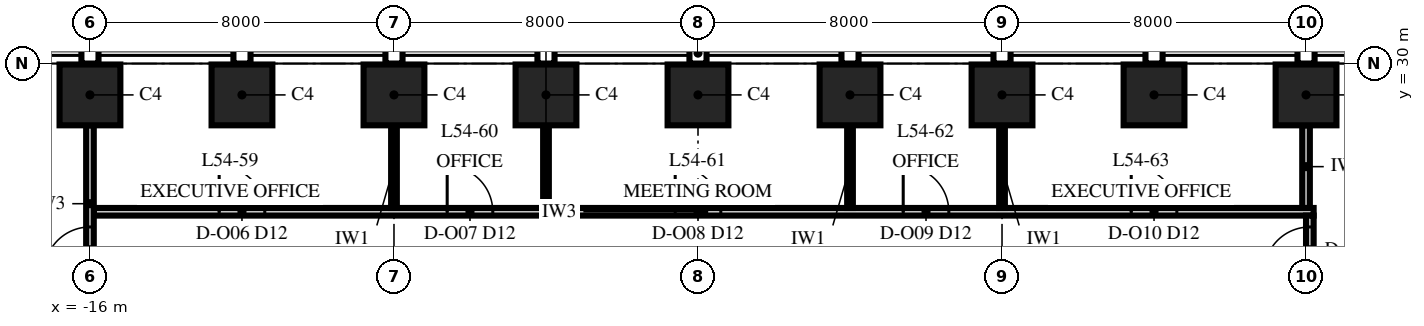
"""IFC4 building model, lengths in metres.
Left out: names, types, materials, properties, quantities, classifications, styles, units other than length and angle.
Written with IfcOpenShell. Run it as: python <this file> out.ifc"""

import sys

from ifc_helpers import new_model, si_unit, direction, frame, frame_2d, origin, origin_2d, place, context, subcontext, project, spatial, rectangle, extrude, element, fill, save


model = new_model("IFC4")
c1 = context("Model", 3, precision=1e-05, world=origin(), true_north=direction((0.0, 1.0)))
c2 = subcontext(c1, "Body", "Model", "MODEL_VIEW")
j1 = project(units=[si_unit("LENGTHUNIT", "METRE"), si_unit("PLANEANGLEUNIT", "RADIAN")], contexts=[c1])
p1 = place(None, origin())
s1 = spatial("IfcSite", under=j1, at=p1, CompositionType="ELEMENT")
p2 = place(p1, origin())
s2 = spatial("IfcBuilding", under=s1, at=p2, CompositionType="ELEMENT")
p3 = place(p2, frame((0.0, 0.0, 234.0)))
s3 = spatial("IfcBuildingStorey", under=s2, at=p3, CompositionType="ELEMENT", Elevation=234.0)
for number, where, z_axis, x_axis in (
    (1, (16.0, 29.175, 0.0), (0.0, 0.0, 1.0), (-1.0, 0.0, 0.0)),
    (2, (12.0, 29.175, 0.0), (0.0, 0.0, 1.0), (-1.0, 0.0, 0.0)),
    (3, (8.0, 29.175, 0.0), (0.0, 0.0, 1.0), (-1.0, 0.0, 0.0)),
    (4, (4.0, 29.175, 0.0), (0.0, 0.0, 1.0), (-1.0, 0.0, 0.0)),
    (5, (0.0, 29.175, 0.0), (0.0, 0.0, 1.0), (-1.0, 0.0, 0.0)),
    (6, (-4.0, 29.175, 0.0), (0.0, 0.0, 1.0), (-1.0, 0.0, 0.0)),
    (7, (-8.0, 29.175, 0.0), (0.0, 0.0, 1.0), (-1.0, 0.0, 0.0)),
    (8, (-12.0, 29.175, 0.0), (0.0, 0.0, 1.0), (-1.0, 0.0, 0.0)),
    (9, (-16.0, 29.175, 0.0), (0.0, 0.0, 1.0), (-1.0, 0.0, 0.0)),
):
    element("IfcColumn", number, at=place(p3, frame(where, z_axis=z_axis, x_axis=x_axis)), inside=s3, PredefinedType="COLUMN", context=c2, shape_type="SweptSolid", body=[
        extrude(rectangle(XDim=1.6, YDim=1.6, at=origin_2d()), origin(), (0.0, 0.0, 1.0), 4.0),
    ])
p4 = place(p3, frame((-15.9, 26.1, 0.0), z_axis=(0.0, 0.0, 1.0), x_axis=(1.0, 0.0, 0.0)))
e10 = element("IfcWall", 10, at=p4, inside=s3, PredefinedType="PARTITIONING", context=c2, shape_type="SweptSolid", body=[
    extrude(rectangle(XDim=32.1, YDim=0.2, at=frame_2d((16.05, 0.0))), origin(), (0.0, 0.0, 1.0), 3.4),
])
p5 = place(p4, frame((3.3, 0.0, 0.0)))
e11 = element("IfcOpeningElement", 11, at=p5, cuts=e10, PredefinedType="OPENING", context=c2, shape_type="SweptSolid", body=[
    extrude(rectangle(XDim=1.2, YDim=2.4, at=frame_2d((0.6, 1.2))), frame((0.0, 0.115, 0.0), z_axis=(0.0, -1.0, 0.0), x_axis=(1.0, 0.0, 0.0)), (0.0, 0.0, 1.0), 0.23),
])
p6 = place(p4, frame((9.3, 0.0, 0.0)))
e12 = element("IfcOpeningElement", 12, at=p6, cuts=e10, PredefinedType="OPENING", context=c2, shape_type="SweptSolid", body=[
    extrude(rectangle(XDim=1.2, YDim=2.4, at=frame_2d((0.6, 1.2))), frame((0.0, 0.115, 0.0), z_axis=(0.0, -1.0, 0.0), x_axis=(1.0, 0.0, 0.0)), (0.0, 0.0, 1.0), 0.23),
])
p7 = place(p4, frame((15.3, 0.0, 0.0)))
e13 = element("IfcOpeningElement", 13, at=p7, cuts=e10, PredefinedType="OPENING", context=c2, shape_type="SweptSolid", body=[
    extrude(rectangle(XDim=1.2, YDim=2.4, at=frame_2d((0.6, 1.2))), frame((0.0, 0.115, 0.0), z_axis=(0.0, -1.0, 0.0), x_axis=(1.0, 0.0, 0.0)), (0.0, 0.0, 1.0), 0.23),
])
p8 = place(p4, frame((21.3, 0.0, 0.0)))
e14 = element("IfcOpeningElement", 14, at=p8, cuts=e10, PredefinedType="OPENING", context=c2, shape_type="SweptSolid", body=[
    extrude(rectangle(XDim=1.2, YDim=2.4, at=frame_2d((0.6, 1.2))), frame((0.0, 0.115, 0.0), z_axis=(0.0, -1.0, 0.0), x_axis=(1.0, 0.0, 0.0)), (0.0, 0.0, 1.0), 0.23),
])
p9 = place(p4, frame((27.3, 0.0, 0.0)))
e15 = element("IfcOpeningElement", 15, at=p9, cuts=e10, PredefinedType="OPENING", context=c2, shape_type="SweptSolid", body=[
    extrude(rectangle(XDim=1.2, YDim=2.4, at=frame_2d((0.6, 1.2))), frame((0.0, 0.115, 0.0), z_axis=(0.0, -1.0, 0.0), x_axis=(1.0, 0.0, 0.0)), (0.0, 0.0, 1.0), 0.23),
])
p10 = place(p3, frame((-16.0, 24.25, 0.0), z_axis=(0.0, 0.0, 1.0), x_axis=(0.0, 1.0, 0.0)))
e16 = element("IfcWall", 16, at=p10, inside=s3, PredefinedType="PARTITIONING", context=c2, shape_type="SweptSolid", body=[
    extrude(rectangle(XDim=4.125, YDim=0.2, at=frame_2d((2.062, 0.0))), origin(), (0.0, 0.0, 1.0), 3.4),
])
p11 = place(p10, frame((0.25, 0.0, 0.0)))
e17 = element("IfcOpeningElement", 17, at=p11, cuts=e16, PredefinedType="OPENING", context=c2, shape_type="SweptSolid", body=[
    extrude(rectangle(XDim=1.2, YDim=2.4, at=frame_2d((0.6, 1.2))), frame((0.0, 0.115, 0.0), z_axis=(0.0, -1.0, 0.0), x_axis=(1.0, 0.0, 0.0)), (0.0, 0.0, 1.0), 0.23),
])
p12 = place(p3, frame((-8.0, 26.2, 0.0), z_axis=(0.0, 0.0, 1.0), x_axis=(0.0, 1.0, 0.0)))
e18 = element("IfcWall", 18, at=p12, inside=s3, PredefinedType="PARTITIONING", context=c2, shape_type="SweptSolid", body=[
    extrude(rectangle(XDim=2.175, YDim=0.15, at=frame_2d((1.087, 0.0))), origin(), (0.0, 0.0, 1.0), 3.4),
])
for number, where, z_axis, x_axis in (
    (19, (-4.0, 26.2, 0.0), (0.0, 0.0, 1.0), (0.0, 1.0, 0.0)),
    (20, (4.0, 26.2, 0.0), (0.0, 0.0, 1.0), (0.0, 1.0, 0.0)),
):
    element("IfcWall", number, at=place(p3, frame(where, z_axis=z_axis, x_axis=x_axis)), inside=s3, PredefinedType="PARTITIONING", context=c2, shape_type="SweptSolid", body=[
        extrude(rectangle(XDim=2.175, YDim=0.15, at=frame_2d((1.087, 0.0))), origin(), (0.0, 0.0, 1.0), 3.85),
    ])
p13 = place(p3, frame((8.0, 26.2, 0.0), z_axis=(0.0, 0.0, 1.0), x_axis=(0.0, 1.0, 0.0)))
e21 = element("IfcWall", 21, at=p13, inside=s3, PredefinedType="PARTITIONING", context=c2, shape_type="SweptSolid", body=[
    extrude(rectangle(XDim=2.175, YDim=0.15, at=frame_2d((1.087, 0.0))), origin(), (0.0, 0.0, 1.0), 3.4),
])
p14 = place(p3, frame((16.0, 26.2, 0.0), z_axis=(0.0, 0.0, 1.0), x_axis=(0.0, 1.0, 0.0)))
e22 = element("IfcWall", 22, at=p14, inside=s3, PredefinedType="PARTITIONING", context=c2, shape_type="SweptSolid", body=[
    extrude(rectangle(XDim=2.175, YDim=0.2, at=frame_2d((1.087, 0.0))), origin(), (0.0, 0.0, 1.0), 3.4),
])
p15 = place(p3, frame((16.1, 9.9, 0.0), z_axis=(0.0, 0.0, 1.0), x_axis=(0.0, 1.0, 0.0)))
e23 = element("IfcWall", 23, at=p15, inside=s3, PredefinedType="PARTITIONING", context=c2, shape_type="SweptSolid", body=[
    extrude(rectangle(XDim=16.1, YDim=0.2, at=frame_2d((8.05, 0.0))), origin(), (0.0, 0.0, 1.0), 3.25),
])
p16 = place(p15, frame((14.6, 0.0, 0.0)))
e24 = element("IfcOpeningElement", 24, at=p16, cuts=e23, PredefinedType="OPENING", context=c2, shape_type="SweptSolid", body=[
    extrude(rectangle(XDim=1.2, YDim=2.4, at=frame_2d((0.6, 1.2))), frame((0.0, 0.115, 0.0), z_axis=(0.0, -1.0, 0.0), x_axis=(1.0, 0.0, 0.0)), (0.0, 0.0, 1.0), 0.23),
])
p17 = place(p5, origin())
e25 = element("IfcDoor", 25, at=p17, inside=s3, OperationType="SINGLE_SWING_LEFT", PredefinedType="DOOR", context=c2, shape_type="SweptSolid", body=[
    extrude(rectangle(XDim=1.2, YDim=2.4, at=frame_2d((0.6, 1.2))), frame((0.0, 0.1, 0.0), z_axis=(0.0, -1.0, 0.0), x_axis=(1.0, 0.0, 0.0)), (0.0, 0.0, 1.0), 0.199),
])
fill(e11, e25)
p18 = place(p6, origin())
e26 = element("IfcDoor", 26, at=p18, inside=s3, OperationType="SINGLE_SWING_LEFT", PredefinedType="DOOR", context=c2, shape_type="SweptSolid", body=[
    extrude(rectangle(XDim=1.2, YDim=2.4, at=frame_2d((0.6, 1.2))), frame((0.0, 0.1, 0.0), z_axis=(0.0, -1.0, 0.0), x_axis=(1.0, 0.0, 0.0)), (0.0, 0.0, 1.0), 0.199),
])
fill(e12, e26)
p19 = place(p7, origin())
e27 = element("IfcDoor", 27, at=p19, inside=s3, OperationType="SINGLE_SWING_LEFT", PredefinedType="DOOR", context=c2, shape_type="SweptSolid", body=[
    extrude(rectangle(XDim=1.2, YDim=2.4, at=frame_2d((0.6, 1.2))), frame((0.0, 0.1, 0.0), z_axis=(0.0, -1.0, 0.0), x_axis=(1.0, 0.0, 0.0)), (0.0, 0.0, 1.0), 0.199),
])
fill(e13, e27)
p20 = place(p8, origin())
e28 = element("IfcDoor", 28, at=p20, inside=s3, OperationType="SINGLE_SWING_LEFT", PredefinedType="DOOR", context=c2, shape_type="SweptSolid", body=[
    extrude(rectangle(XDim=1.2, YDim=2.4, at=frame_2d((0.6, 1.2))), frame((0.0, 0.1, 0.0), z_axis=(0.0, -1.0, 0.0), x_axis=(1.0, 0.0, 0.0)), (0.0, 0.0, 1.0), 0.199),
])
fill(e14, e28)
p21 = place(p9, origin())
e29 = element("IfcDoor", 29, at=p21, inside=s3, OperationType="SINGLE_SWING_LEFT", PredefinedType="DOOR", context=c2, shape_type="SweptSolid", body=[
    extrude(rectangle(XDim=1.2, YDim=2.4, at=frame_2d((0.6, 1.2))), frame((0.0, 0.1, 0.0), z_axis=(0.0, -1.0, 0.0), x_axis=(1.0, 0.0, 0.0)), (0.0, 0.0, 1.0), 0.199),
])
fill(e15, e29)
p22 = place(p11, origin())
e30 = element("IfcDoor", 30, at=p22, inside=s3, OperationType="SINGLE_SWING_LEFT", PredefinedType="DOOR", context=c2, shape_type="SweptSolid", body=[
    extrude(rectangle(XDim=1.2, YDim=2.4, at=frame_2d((0.6, 1.2))), frame((0.0, 0.1, 0.0), z_axis=(0.0, -1.0, 0.0), x_axis=(1.0, 0.0, 0.0)), (0.0, 0.0, 1.0), 0.199),
])
fill(e17, e30)
p23 = place(p16, origin())
e31 = element("IfcDoor", 31, at=p23, inside=s3, OperationType="SINGLE_SWING_LEFT", PredefinedType="DOOR", context=c2, shape_type="SweptSolid", body=[
    extrude(rectangle(XDim=1.2, YDim=2.4, at=frame_2d((0.6, 1.2))), frame((0.0, 0.1, 0.0), z_axis=(0.0, -1.0, 0.0), x_axis=(1.0, 0.0, 0.0)), (0.0, 0.0, 1.0), 0.199),
])
fill(e24, e31)
save(model, sys.argv[1])
